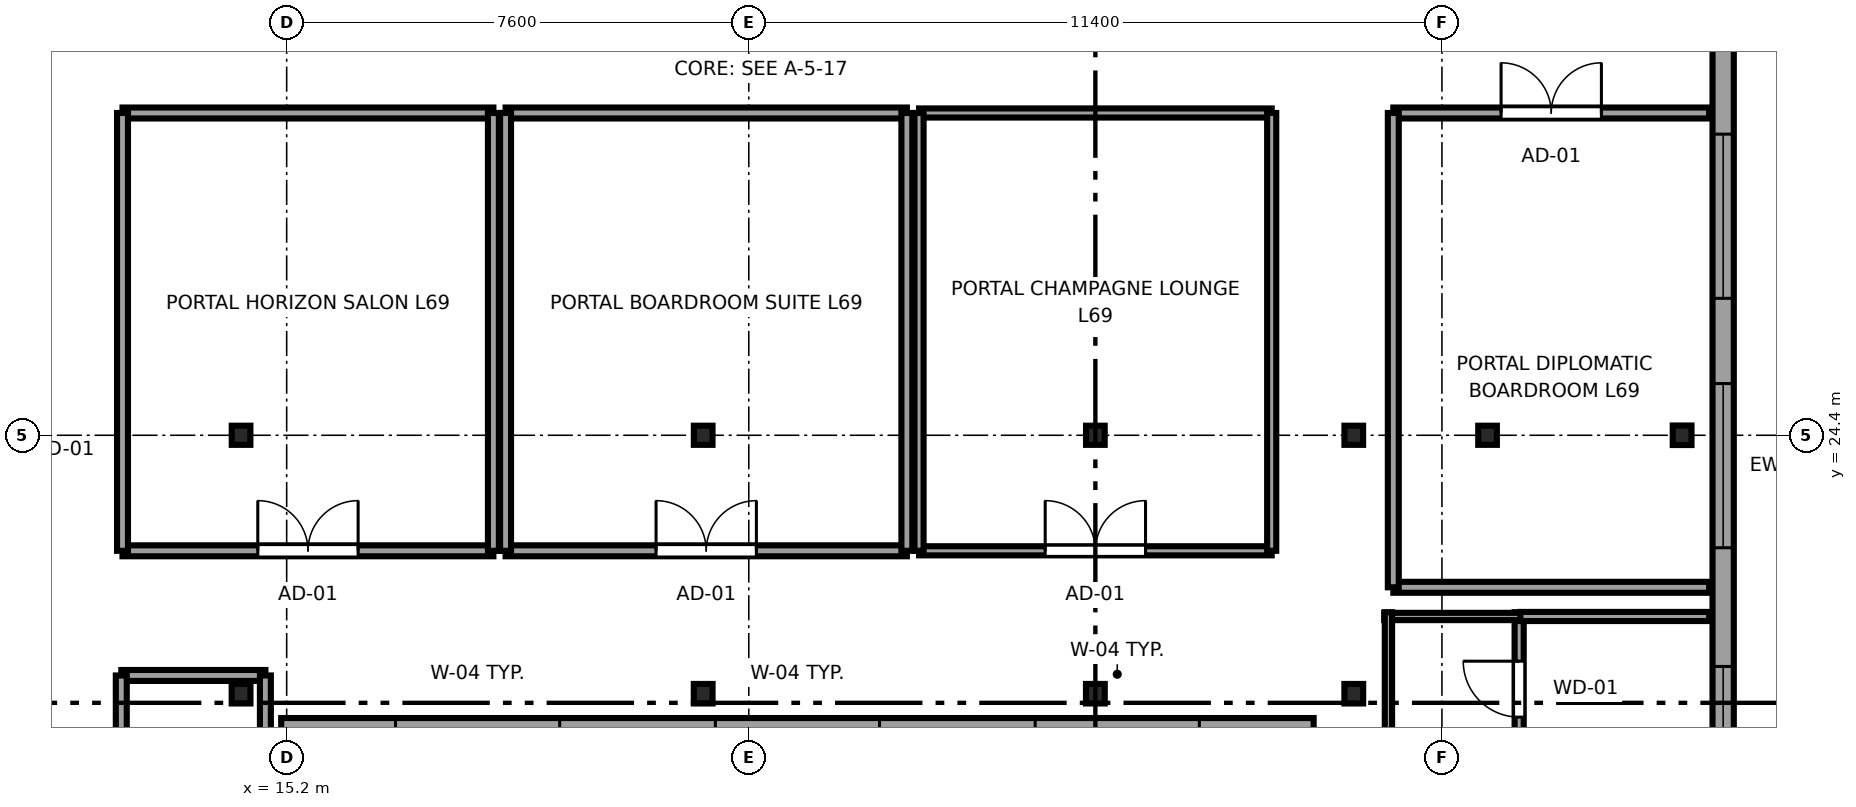
"""IFC4 building model, lengths in metres.
Left out: names, types, materials, properties, quantities, classifications, styles, units other than length and angle.
Written with IfcOpenShell. Run it as: python <this file> out.ifc"""

import sys

from ifc_helpers import new_model, si_unit, direction, frame, frame_2d, origin, origin_2d, place, context, subcontext, project, spatial, rectangle, i_section, extrude, source, transform, mapped, element, fill, save


model = new_model("IFC4")
c1 = context("Model", 3, precision=1e-05, world=origin(), true_north=direction((0.0, 1.0)))
c2 = subcontext(c1, "Body", "Model", "MODEL_VIEW")
j1 = project(units=[si_unit("LENGTHUNIT", "METRE"), si_unit("PLANEANGLEUNIT", "RADIAN")], contexts=[c1])
p1 = place(None, origin())
s1 = spatial("IfcSite", under=j1, at=p1, CompositionType="ELEMENT")
p2 = place(p1, origin())
s2 = spatial("IfcBuilding", under=s1, at=p2, CompositionType="ELEMENT")
p3 = place(p2, frame((0.0, 0.0, 259.4)))
s3 = spatial("IfcBuildingStorey", under=s2, at=p3, CompositionType="ELEMENT", Elevation=259.4)
m1 = source(origin(), c2, "Body", "SweptSolid", [
    extrude(i_section(OverallWidth=0.307, OverallDepth=0.315, WebThickness=0.012, FlangeThickness=0.019, FilletRadius=0.017, at=origin_2d()), origin(), (0.0, 0.0, 1.0), 3.55),
])
for number, where, z_axis, x_axis in (
    (1, (14.45, 24.4, 0.0), (0.0, 0.0, 1.0), (1.0, 0.0, 0.0)),
    (2, (22.05, 24.4, 0.0), (0.0, 0.0, 1.0), (1.0, 0.0, 0.0)),
    (3, (28.5, 24.4, 0.0), (0.0, 0.0, 1.0), (1.0, 0.0, 0.0)),
    (4, (32.75, 24.4, 0.0), (0.0, 0.0, 1.0), (1.0, 0.0, 0.0)),
    (5, (34.95, 24.4, 0.0), (0.0, 0.0, 1.0), (1.0, 0.0, 0.0)),
):
    element("IfcColumn", number, at=place(p3, frame(where, z_axis=z_axis, x_axis=x_axis)), inside=s3, PredefinedType="COLUMN", context=c2, shape_type="MappedRepresentation", body=[
        mapped(m1, transform((0.0, 0.0, 0.0), x_axis=(1.0, 0.0, 0.0), y_axis=(0.0, 1.0, 0.0), z_axis=(0.0, 0.0, 1.0), scale=1.0)),
    ])
m2 = source(origin(), c2, "Body", "SweptSolid", [
    extrude(i_section(OverallWidth=0.309, OverallDepth=0.321, WebThickness=0.014, FlangeThickness=0.022, FilletRadius=0.017, at=origin_2d()), origin(), (0.0, 0.0, 1.0), 3.55),
])
for number, where, z_axis, x_axis in (
    (6, (38.15, 24.4, 0.0), (0.0, 0.0, 1.0), (1.0, 0.0, 0.0)),
    (7, (14.45, 20.15, 0.0), (0.0, 0.0, 1.0), (1.0, 0.0, 0.0)),
    (8, (22.05, 20.15, 0.0), (0.0, 0.0, 1.0), (1.0, 0.0, 0.0)),
    (9, (28.5, 20.15, 0.0), (0.0, 0.0, 1.0), (1.0, 0.0, 0.0)),
    (10, (32.75, 20.15, 0.0), (0.0, 0.0, 1.0), (1.0, 0.0, 0.0)),
):
    element("IfcColumn", number, at=place(p3, frame(where, z_axis=z_axis, x_axis=x_axis)), inside=s3, PredefinedType="COLUMN", context=c2, shape_type="MappedRepresentation", body=[
        mapped(m2, transform((0.0, 0.0, 0.0), x_axis=(1.0, 0.0, 0.0), y_axis=(0.0, 1.0, 0.0), z_axis=(0.0, 0.0, 1.0), scale=1.0)),
    ])
p4 = place(p3, frame((15.11, 19.575, 0.0), z_axis=(0.0, 0.0, 1.0), x_axis=(1.0, 0.0, 0.0)))
e11 = element("IfcWall", 11, at=p4, inside=s3, PredefinedType="SOLIDWALL", context=c2, shape_type="SweptSolid", body=[
    extrude(rectangle(XDim=16.98, YDim=0.35, at=frame_2d((8.49, 0.0))), origin(), (0.0, 0.0, 1.0), 3.37),
])
p5 = place(p4, frame((1.88, 0.0, 0.68)))
e12 = element("IfcOpeningElement", 12, at=p5, cuts=e11, PredefinedType="OPENING", context=c2, shape_type="SweptSolid", body=[
    extrude(rectangle(XDim=2.7, YDim=1.95, at=frame_2d((1.35, 0.975))), frame((0.0, 0.185, 0.0), z_axis=(0.0, -1.0, 0.0), x_axis=(1.0, 0.0, 0.0)), (0.0, 0.0, 1.0), 0.37),
])
p6 = place(p4, frame((7.14, 0.0, 0.68)))
e13 = element("IfcOpeningElement", 13, at=p6, cuts=e11, PredefinedType="OPENING", context=c2, shape_type="SweptSolid", body=[
    extrude(rectangle(XDim=2.7, YDim=1.95, at=frame_2d((1.35, 0.975))), frame((0.0, 0.185, 0.0), z_axis=(0.0, -1.0, 0.0), x_axis=(1.0, 0.0, 0.0)), (0.0, 0.0, 1.0), 0.37),
])
p7 = place(p4, frame((12.4, 0.0, 0.68)))
e14 = element("IfcOpeningElement", 14, at=p7, cuts=e11, PredefinedType="OPENING", context=c2, shape_type="SweptSolid", body=[
    extrude(rectangle(XDim=2.7, YDim=1.95, at=frame_2d((1.35, 0.975))), frame((0.0, 0.185, 0.0), z_axis=(0.0, -1.0, 0.0), x_axis=(1.0, 0.0, 0.0)), (0.0, 0.0, 1.0), 0.37),
])
p8 = place(p3, frame((38.825, 7.017, 0.0), z_axis=(0.0, 0.0, 1.0), x_axis=(0.0, 1.0, 0.0)))
e15 = element("IfcWall", 15, at=p8, inside=s3, PredefinedType="SOLIDWALL", context=c2, shape_type="SweptSolid", body=[
    extrude(rectangle(XDim=33.766, YDim=0.35, at=frame_2d((16.883, 0.0))), origin(), (0.0, 0.0, 1.0), 3.37),
])
p9 = place(p8, frame((10.881, 0.0, 0.68)))
e16 = element("IfcOpeningElement", 16, at=p9, cuts=e15, PredefinedType="OPENING", context=c2, shape_type="SweptSolid", body=[
    extrude(rectangle(XDim=2.7, YDim=1.95, at=frame_2d((1.35, 0.975))), frame((0.0, 0.185, 0.0), z_axis=(0.0, -1.0, 0.0), x_axis=(1.0, 0.0, 0.0)), (0.0, 0.0, 1.0), 0.37),
])
p10 = place(p8, frame((15.533, 0.0, 0.68)))
e17 = element("IfcOpeningElement", 17, at=p10, cuts=e15, PredefinedType="OPENING", context=c2, shape_type="SweptSolid", body=[
    extrude(rectangle(XDim=2.7, YDim=1.95, at=frame_2d((1.35, 0.975))), frame((0.0, 0.185, 0.0), z_axis=(0.0, -1.0, 0.0), x_axis=(1.0, 0.0, 0.0)), (0.0, 0.0, 1.0), 0.37),
])
p11 = place(p8, frame((19.635, 0.0, 0.68)))
e18 = element("IfcOpeningElement", 18, at=p11, cuts=e15, PredefinedType="OPENING", context=c2, shape_type="SweptSolid", body=[
    extrude(rectangle(XDim=2.7, YDim=1.95, at=frame_2d((1.35, 0.975))), frame((0.0, 0.185, 0.0), z_axis=(0.0, -1.0, 0.0), x_axis=(1.0, 0.0, 0.0)), (0.0, 0.0, 1.0), 0.37),
])
p12 = place(p8, frame((25.387, 0.0, 0.68)))
e19 = element("IfcOpeningElement", 19, at=p12, cuts=e15, PredefinedType="OPENING", context=c2, shape_type="SweptSolid", body=[
    extrude(rectangle(XDim=2.7, YDim=1.95, at=frame_2d((1.35, 0.975))), frame((0.0, 0.185, 0.0), z_axis=(0.0, -1.0, 0.0), x_axis=(1.0, 0.0, 0.0)), (0.0, 0.0, 1.0), 0.37),
])
p13 = place(p8, frame((29.489, 0.0, 0.68)))
e20 = element("IfcOpeningElement", 20, at=p13, cuts=e15, PredefinedType="OPENING", context=c2, shape_type="SweptSolid", body=[
    extrude(rectangle(XDim=2.7, YDim=1.95, at=frame_2d((1.35, 0.975))), frame((0.0, 0.185, 0.0), z_axis=(0.0, -1.0, 0.0), x_axis=(1.0, 0.0, 0.0)), (0.0, 0.0, 1.0), 0.37),
])
p14 = place(p8, frame((0.686, 0.0, 0.62)))
e21 = element("IfcOpeningElement", 21, at=p14, cuts=e15, PredefinedType="OPENING", context=c2, shape_type="SweptSolid", body=[
    extrude(rectangle(XDim=1.5, YDim=1.55, at=frame_2d((0.75, 0.775))), frame((0.0, 0.185, 0.0), z_axis=(0.0, -1.0, 0.0), x_axis=(1.0, 0.0, 0.0)), (0.0, 0.0, 1.0), 0.37),
])
p15 = place(p8, frame((4.733, 0.0, 0.62)))
e22 = element("IfcOpeningElement", 22, at=p15, cuts=e15, PredefinedType="OPENING", context=c2, shape_type="SweptSolid", body=[
    extrude(rectangle(XDim=1.5, YDim=1.55, at=frame_2d((0.75, 0.775))), frame((0.0, 0.185, 0.0), z_axis=(0.0, -1.0, 0.0), x_axis=(1.0, 0.0, 0.0)), (0.0, 0.0, 1.0), 0.37),
])
p16 = place(p3, frame((35.47, 19.1, 0.0), z_axis=(0.0, 0.0, 1.0), x_axis=(0.0, 1.0, 0.0)))
e23 = element("IfcWall", 23, at=p16, inside=s3, PredefinedType="PARTITIONING", context=c2, shape_type="SweptSolid", body=[
    extrude(rectangle(XDim=2.39, YDim=0.15, at=frame_2d((1.195, 0.0))), origin(), (0.0, 0.0, 1.0), 3.37),
])
p17 = place(p16, frame((0.665, 0.0, 0.0)))
e24 = element("IfcOpeningElement", 24, at=p17, cuts=e23, PredefinedType="OPENING", context=c2, shape_type="SweptSolid", body=[
    extrude(rectangle(XDim=0.92, YDim=2.01, at=frame_2d((0.46, 1.005))), frame((0.0, 0.085, 0.0), z_axis=(0.0, -1.0, 0.0), x_axis=(1.0, 0.0, 0.0)), (0.0, 0.0, 1.0), 0.17),
])
p18 = place(p3, frame((33.25, 21.42, 0.0), z_axis=(0.0, 0.0, 1.0), x_axis=(1.0, 0.0, 0.0)))
e25 = element("IfcWall", 25, at=p18, inside=s3, PredefinedType="PLUMBINGWALL", context=c2, shape_type="SweptSolid", body=[
    extrude(rectangle(XDim=2.29, YDim=0.12, at=frame_2d((1.145, 0.0))), origin(), (0.0, 0.0, 1.0), 3.37),
])
p19 = place(p3, frame((33.32, 19.1, 0.0), z_axis=(0.0, 0.0, 1.0), x_axis=(0.0, 1.0, 0.0)))
e26 = element("IfcWall", 26, at=p19, inside=s3, PredefinedType="PLUMBINGWALL", context=c2, shape_type="SweptSolid", body=[
    extrude(rectangle(XDim=2.39, YDim=0.12, at=frame_2d((1.195, 0.0))), origin(), (0.0, 0.0, 1.0), 3.37),
])
p20 = place(p3, frame((35.49, 21.42, 0.0), z_axis=(0.0, 0.0, 1.0), x_axis=(1.0, 0.0, 0.0)))
e27 = element("IfcWall", 27, at=p20, inside=s3, PredefinedType="PARTITIONING", context=c2, shape_type="SweptSolid", body=[
    extrude(rectangle(XDim=3.105, YDim=0.15, at=frame_2d((1.552, 0.0))), origin(), (0.0, 0.0, 1.0), 3.37),
])
p21 = place(p3, frame((12.48, 20.45, 0.0), z_axis=(0.0, 0.0, 1.0), x_axis=(1.0, 0.0, 0.0)))
e28 = element("IfcWall", 28, at=p21, inside=s3, PredefinedType="PARTITIONING", context=c2, shape_type="SweptSolid", body=[
    extrude(rectangle(XDim=2.37, YDim=0.18, at=frame_2d((1.185, 0.0))), origin(), (0.0, 0.0, 1.0), 3.37),
])
p22 = place(p3, frame((12.48, 10.2, 0.0), z_axis=(0.0, 0.0, 1.0), x_axis=(0.0, 1.0, 0.0)))
e29 = element("IfcWall", 29, at=p22, inside=s3, PredefinedType="PARTITIONING", context=c2, shape_type="SweptSolid", body=[
    extrude(rectangle(XDim=10.25, YDim=0.18, at=frame_2d((5.125, 0.0))), origin(), (0.0, 0.0, 1.0), 3.37),
])
p23 = place(p22, frame((4.3, 0.0, 0.0)))
e30 = element("IfcOpeningElement", 30, at=p23, cuts=e29, PredefinedType="OPENING", context=c2, shape_type="SweptSolid", body=[
    extrude(rectangle(XDim=1.65, YDim=2.15, at=frame_2d((0.825, 1.075))), frame((0.0, 0.1, 0.0), z_axis=(0.0, -1.0, 0.0), x_axis=(1.0, 0.0, 0.0)), (0.0, 0.0, 1.0), 0.2),
])
p24 = place(p3, frame((14.85, 10.2, 0.0), z_axis=(0.0, 0.0, 1.0), x_axis=(0.0, 1.0, 0.0)))
e31 = element("IfcWall", 31, at=p24, inside=s3, PredefinedType="PARTITIONING", context=c2, shape_type="SweptSolid", body=[
    extrude(rectangle(XDim=10.25, YDim=0.18, at=frame_2d((5.125, 0.0))), origin(), (0.0, 0.0, 1.0), 3.37),
])
p25 = place(p3, frame((12.5, 22.5, 0.0), z_axis=(0.0, 0.0, 1.0), x_axis=(1.0, 0.0, 0.0)))
e32 = element("IfcWall", 32, at=p25, inside=s3, PredefinedType="PARTITIONING", context=c2, shape_type="SweptSolid", body=[
    extrude(rectangle(XDim=6.1, YDim=0.18, at=frame_2d((3.05, 0.0))), origin(), (0.0, 0.0, 1.0), 3.37),
])
p26 = place(p25, frame((2.225, 0.0, 0.0)))
e33 = element("IfcOpeningElement", 33, at=p26, cuts=e32, PredefinedType="OPENING", context=c2, shape_type="SweptSolid", body=[
    extrude(rectangle(XDim=1.65, YDim=2.15, at=frame_2d((0.825, 1.075))), frame((0.0, 0.1, 0.0), z_axis=(0.0, -1.0, 0.0), x_axis=(1.0, 0.0, 0.0)), (0.0, 0.0, 1.0), 0.2),
])
p27 = place(p3, frame((12.5, 29.7, 0.0), z_axis=(0.0, 0.0, 1.0), x_axis=(1.0, 0.0, 0.0)))
e34 = element("IfcWall", 34, at=p27, inside=s3, PredefinedType="PARTITIONING", context=c2, shape_type="SweptSolid", body=[
    extrude(rectangle(XDim=6.1, YDim=0.18, at=frame_2d((3.05, 0.0))), origin(), (0.0, 0.0, 1.0), 3.37),
])
for number, where, z_axis, x_axis in (
    (35, (12.5, 22.5, 0.0), (0.0, 0.0, 1.0), (0.0, 1.0, 0.0)),
    (36, (18.6, 22.5, 0.0), (0.0, 0.0, 1.0), (0.0, 1.0, 0.0)),
):
    element("IfcWall", number, at=place(p3, frame(where, z_axis=z_axis, x_axis=x_axis)), inside=s3, PredefinedType="PARTITIONING", context=c2, shape_type="SweptSolid", body=[
        extrude(rectangle(XDim=7.2, YDim=0.18, at=frame_2d((3.6, 0.0))), origin(), (0.0, 0.0, 1.0), 3.37),
    ])
p28 = place(p3, frame((18.8, 22.5, 0.0), z_axis=(0.0, 0.0, 1.0), x_axis=(1.0, 0.0, 0.0)))
e37 = element("IfcWall", 37, at=p28, inside=s3, PredefinedType="PARTITIONING", context=c2, shape_type="SweptSolid", body=[
    extrude(rectangle(XDim=6.6, YDim=0.18, at=frame_2d((3.3, 0.0))), origin(), (0.0, 0.0, 1.0), 3.37),
])
p29 = place(p28, frame((2.475, 0.0, 0.0)))
e38 = element("IfcOpeningElement", 38, at=p29, cuts=e37, PredefinedType="OPENING", context=c2, shape_type="SweptSolid", body=[
    extrude(rectangle(XDim=1.65, YDim=2.15, at=frame_2d((0.825, 1.075))), frame((0.0, 0.1, 0.0), z_axis=(0.0, -1.0, 0.0), x_axis=(1.0, 0.0, 0.0)), (0.0, 0.0, 1.0), 0.2),
])
p30 = place(p3, frame((18.8, 29.7, 0.0), z_axis=(0.0, 0.0, 1.0), x_axis=(1.0, 0.0, 0.0)))
e39 = element("IfcWall", 39, at=p30, inside=s3, PredefinedType="PARTITIONING", context=c2, shape_type="SweptSolid", body=[
    extrude(rectangle(XDim=6.6, YDim=0.18, at=frame_2d((3.3, 0.0))), origin(), (0.0, 0.0, 1.0), 3.37),
])
for number, where, z_axis, x_axis in (
    (40, (18.8, 22.5, 0.0), (0.0, 0.0, 1.0), (0.0, 1.0, 0.0)),
    (41, (25.4, 22.5, 0.0), (0.0, 0.0, 1.0), (0.0, 1.0, 0.0)),
):
    element("IfcWall", number, at=place(p3, frame(where, z_axis=z_axis, x_axis=x_axis)), inside=s3, PredefinedType="PARTITIONING", context=c2, shape_type="SweptSolid", body=[
        extrude(rectangle(XDim=7.2, YDim=0.18, at=frame_2d((3.6, 0.0))), origin(), (0.0, 0.0, 1.0), 3.37),
    ])
p31 = place(p3, frame((25.6, 22.5, 0.0), z_axis=(0.0, 0.0, 1.0), x_axis=(1.0, 0.0, 0.0)))
e42 = element("IfcWall", 42, at=p31, inside=s3, PredefinedType="PARTITIONING", context=c2, shape_type="SweptSolid", body=[
    extrude(rectangle(XDim=5.8, YDim=0.15, at=frame_2d((2.9, 0.0))), origin(), (0.0, 0.0, 1.0), 3.37),
])
p32 = place(p31, frame((2.075, 0.0, 0.0)))
e43 = element("IfcOpeningElement", 43, at=p32, cuts=e42, PredefinedType="OPENING", context=c2, shape_type="SweptSolid", body=[
    extrude(rectangle(XDim=1.65, YDim=2.15, at=frame_2d((0.825, 1.075))), frame((0.0, 0.085, 0.0), z_axis=(0.0, -1.0, 0.0), x_axis=(1.0, 0.0, 0.0)), (0.0, 0.0, 1.0), 0.17),
])
p33 = place(p3, frame((25.6, 29.7, 0.0), z_axis=(0.0, 0.0, 1.0), x_axis=(1.0, 0.0, 0.0)))
e44 = element("IfcWall", 44, at=p33, inside=s3, PredefinedType="PARTITIONING", context=c2, shape_type="SweptSolid", body=[
    extrude(rectangle(XDim=5.8, YDim=0.15, at=frame_2d((2.9, 0.0))), origin(), (0.0, 0.0, 1.0), 3.37),
])
for number, where, z_axis, x_axis in (
    (45, (25.6, 22.5, 0.0), (0.0, 0.0, 1.0), (0.0, 1.0, 0.0)),
    (46, (31.4, 22.5, 0.0), (0.0, 0.0, 1.0), (0.0, 1.0, 0.0)),
):
    element("IfcWall", number, at=place(p3, frame(where, z_axis=z_axis, x_axis=x_axis)), inside=s3, PredefinedType="PARTITIONING", context=c2, shape_type="SweptSolid", body=[
        extrude(rectangle(XDim=7.2, YDim=0.15, at=frame_2d((3.6, 0.0))), origin(), (0.0, 0.0, 1.0), 3.37),
    ])
p34 = place(p3, frame((33.4, 21.9, 0.0), z_axis=(0.0, 0.0, 1.0), x_axis=(1.0, 0.0, 0.0)))
e47 = element("IfcWall", 47, at=p34, inside=s3, PredefinedType="PARTITIONING", context=c2, shape_type="SweptSolid", body=[
    extrude(rectangle(XDim=5.195, YDim=0.18, at=frame_2d((2.598, 0.0))), origin(), (0.0, 0.0, 1.0), 3.37),
])
p35 = place(p3, frame((33.4, 29.7, 0.0), z_axis=(0.0, 0.0, 1.0), x_axis=(1.0, 0.0, 0.0)))
e48 = element("IfcWall", 48, at=p35, inside=s3, PredefinedType="PARTITIONING", context=c2, shape_type="SweptSolid", body=[
    extrude(rectangle(XDim=5.195, YDim=0.18, at=frame_2d((2.598, 0.0))), origin(), (0.0, 0.0, 1.0), 3.37),
])
p36 = place(p35, frame((1.772, 0.0, 0.0)))
e49 = element("IfcOpeningElement", 49, at=p36, cuts=e48, PredefinedType="OPENING", context=c2, shape_type="SweptSolid", body=[
    extrude(rectangle(XDim=1.65, YDim=2.15, at=frame_2d((0.825, 1.075))), frame((0.0, 0.1, 0.0), z_axis=(0.0, -1.0, 0.0), x_axis=(1.0, 0.0, 0.0)), (0.0, 0.0, 1.0), 0.2),
])
p37 = place(p3, frame((33.4, 21.9, 0.0), z_axis=(0.0, 0.0, 1.0), x_axis=(0.0, 1.0, 0.0)))
e50 = element("IfcWall", 50, at=p37, inside=s3, PredefinedType="PARTITIONING", context=c2, shape_type="SweptSolid", body=[
    extrude(rectangle(XDim=7.8, YDim=0.18, at=frame_2d((3.9, 0.0))), origin(), (0.0, 0.0, 1.0), 3.37),
])
m3 = source(origin(), c2, "Body", "SweptSolid", [
    extrude(rectangle(XDim=2.7, YDim=1.95, at=frame_2d((1.35, 0.975))), frame((0.0, 0.09, 0.0), z_axis=(0.0, -1.0, 0.0), x_axis=(1.0, 0.0, 0.0)), (0.0, 0.0, 1.0), 0.06),
])
p38 = place(p5, origin())
e51 = element("IfcWindow", 51, at=p38, inside=s3, PartitioningType="TRIPLE_PANEL_HORIZONTAL", PredefinedType="WINDOW", context=c2, shape_type="MappedRepresentation", body=[
    mapped(m3, transform((0.0, 0.0, 0.0), x_axis=(1.0, 0.0, 0.0), y_axis=(0.0, 1.0, 0.0), z_axis=(0.0, 0.0, 1.0), scale=1.0)),
])
fill(e12, e51)
p39 = place(p6, origin())
e52 = element("IfcWindow", 52, at=p39, inside=s3, PartitioningType="TRIPLE_PANEL_HORIZONTAL", PredefinedType="WINDOW", context=c2, shape_type="MappedRepresentation", body=[
    mapped(m3, transform((0.0, 0.0, 0.0), x_axis=(1.0, 0.0, 0.0), y_axis=(0.0, 1.0, 0.0), z_axis=(0.0, 0.0, 1.0), scale=1.0)),
])
fill(e13, e52)
p40 = place(p7, origin())
e53 = element("IfcWindow", 53, at=p40, inside=s3, PartitioningType="TRIPLE_PANEL_HORIZONTAL", PredefinedType="WINDOW", context=c2, shape_type="MappedRepresentation", body=[
    mapped(m3, transform((0.0, 0.0, 0.0), x_axis=(1.0, 0.0, 0.0), y_axis=(0.0, 1.0, 0.0), z_axis=(0.0, 0.0, 1.0), scale=1.0)),
])
fill(e14, e53)
p41 = place(p9, origin())
e54 = element("IfcWindow", 54, at=p41, inside=s3, PartitioningType="TRIPLE_PANEL_HORIZONTAL", PredefinedType="WINDOW", context=c2, shape_type="MappedRepresentation", body=[
    mapped(m3, transform((0.0, 0.0, 0.0), x_axis=(1.0, 0.0, 0.0), y_axis=(0.0, 1.0, 0.0), z_axis=(0.0, 0.0, 1.0), scale=1.0)),
])
fill(e16, e54)
p42 = place(p10, origin())
e55 = element("IfcWindow", 55, at=p42, inside=s3, PartitioningType="TRIPLE_PANEL_HORIZONTAL", PredefinedType="WINDOW", context=c2, shape_type="MappedRepresentation", body=[
    mapped(m3, transform((0.0, 0.0, 0.0), x_axis=(1.0, 0.0, 0.0), y_axis=(0.0, 1.0, 0.0), z_axis=(0.0, 0.0, 1.0), scale=1.0)),
])
fill(e17, e55)
p43 = place(p11, origin())
e56 = element("IfcWindow", 56, at=p43, inside=s3, PartitioningType="TRIPLE_PANEL_HORIZONTAL", PredefinedType="WINDOW", context=c2, shape_type="MappedRepresentation", body=[
    mapped(m3, transform((0.0, 0.0, 0.0), x_axis=(1.0, 0.0, 0.0), y_axis=(0.0, 1.0, 0.0), z_axis=(0.0, 0.0, 1.0), scale=1.0)),
])
fill(e18, e56)
m4 = source(origin(), c2, "Body", "SweptSolid", [
    extrude(rectangle(XDim=0.92, YDim=2.01, at=frame_2d((0.46, 1.005))), frame((0.0, 0.025, 0.0), z_axis=(0.0, -1.0, 0.0), x_axis=(1.0, 0.0, 0.0)), (0.0, 0.0, 1.0), 0.05),
])
p44 = place(p17, origin())
e57 = element("IfcDoor", 57, at=p44, inside=s3, OperationType="SINGLE_SWING_RIGHT", PredefinedType="DOOR", context=c2, shape_type="MappedRepresentation", body=[
    mapped(m4, transform((0.0, 0.0, 0.0), x_axis=(1.0, 0.0, 0.0), y_axis=(0.0, 1.0, 0.0), z_axis=(0.0, 0.0, 1.0), scale=1.0)),
])
fill(e24, e57)
m5 = source(origin(), c2, "Body", "SweptSolid", [
    extrude(rectangle(XDim=1.65, YDim=2.15, at=frame_2d((0.825, 1.075))), frame((0.0, 0.025, 0.0), z_axis=(0.0, -1.0, 0.0), x_axis=(1.0, 0.0, 0.0)), (0.0, 0.0, 1.0), 0.05),
])
p45 = place(p26, origin())
e58 = element("IfcDoor", 58, at=p45, inside=s3, OperationType="DOUBLE_DOOR_SINGLE_SWING", PredefinedType="DOOR", context=c2, shape_type="MappedRepresentation", body=[
    mapped(m5, transform((0.0, 0.0, 0.0), x_axis=(1.0, 0.0, 0.0), y_axis=(0.0, 1.0, 0.0), z_axis=(0.0, 0.0, 1.0), scale=1.0)),
])
fill(e33, e58)
p46 = place(p29, origin())
e59 = element("IfcDoor", 59, at=p46, inside=s3, OperationType="DOUBLE_DOOR_SINGLE_SWING", PredefinedType="DOOR", context=c2, shape_type="MappedRepresentation", body=[
    mapped(m5, transform((0.0, 0.0, 0.0), x_axis=(1.0, 0.0, 0.0), y_axis=(0.0, 1.0, 0.0), z_axis=(0.0, 0.0, 1.0), scale=1.0)),
])
fill(e38, e59)
p47 = place(p32, origin())
e60 = element("IfcDoor", 60, at=p47, inside=s3, OperationType="DOUBLE_DOOR_SINGLE_SWING", PredefinedType="DOOR", context=c2, shape_type="MappedRepresentation", body=[
    mapped(m5, transform((0.0, 0.0, 0.0), x_axis=(1.0, 0.0, 0.0), y_axis=(0.0, 1.0, 0.0), z_axis=(0.0, 0.0, 1.0), scale=1.0)),
])
fill(e43, e60)
p48 = place(p36, origin())
e61 = element("IfcDoor", 61, at=p48, inside=s3, OperationType="DOUBLE_DOOR_SINGLE_SWING", PredefinedType="DOOR", context=c2, shape_type="MappedRepresentation", body=[
    mapped(m5, transform((0.0, 0.0, 0.0), x_axis=(1.0, 0.0, 0.0), y_axis=(0.0, 1.0, 0.0), z_axis=(0.0, 0.0, 1.0), scale=1.0)),
])
fill(e49, e61)
save(model, sys.argv[1])
